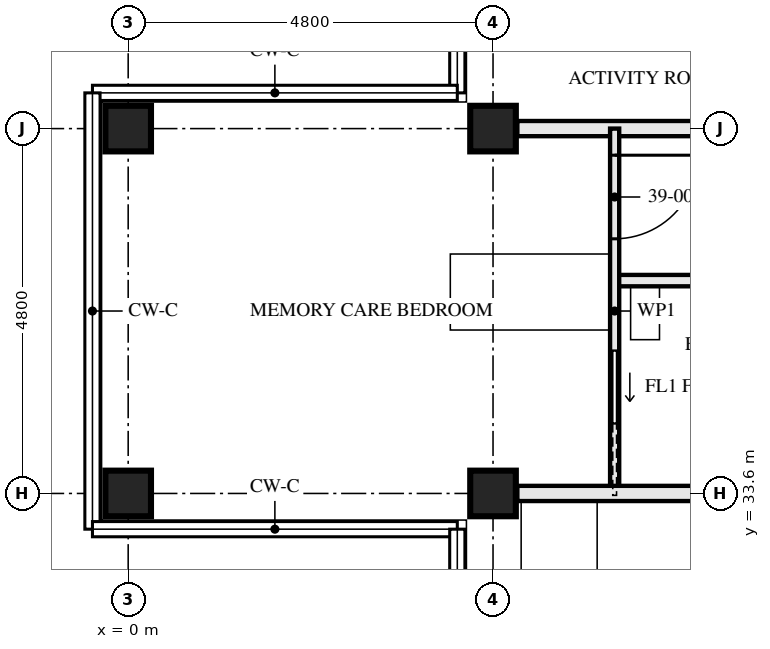
"""IFC4 building model, lengths in metres.
Left out: names, types, materials, properties, quantities, classifications, styles, units other than length and angle.
Written with IfcOpenShell. Run it as: python <this file> out.ifc"""

import sys

from ifc_helpers import new_model, si_unit, direction, frame, frame_2d, origin, origin_2d, place, context, subcontext, project, spatial, rectangle, hollow_rectangle, extrude, element, fill, save


model = new_model("IFC4")
c1 = context("Model", 3, precision=1e-05, world=origin(), true_north=direction((0.0, 1.0)))
c2 = subcontext(c1, "Body", "Model", "MODEL_VIEW")
j1 = project(units=[si_unit("LENGTHUNIT", "METRE"), si_unit("PLANEANGLEUNIT", "RADIAN")], contexts=[c1])
p1 = place(None, origin())
s1 = spatial("IfcSite", under=j1, at=p1, CompositionType="ELEMENT")
p2 = place(p1, origin())
s2 = spatial("IfcBuilding", under=s1, at=p2, CompositionType="ELEMENT")
p3 = place(p2, frame((0.0, 0.0, 144.5)))
s3 = spatial("IfcBuildingStorey", under=s2, at=p3, CompositionType="ELEMENT", Elevation=144.5)
for number, where, z_axis, x_axis in (
    (1, (0.0, 33.6, 0.0), (0.0, 0.0, 1.0), (0.0, 1.0, 0.0)),
    (2, (0.0, 38.4, 0.0), (0.0, 0.0, 1.0), (0.0, 1.0, 0.0)),
    (3, (4.8, 33.6, 0.0), (0.0, 0.0, 1.0), (0.0, 1.0, 0.0)),
    (4, (4.8, 38.4, 0.0), (0.0, 0.0, 1.0), (0.0, 1.0, 0.0)),
):
    element("IfcColumn", number, at=place(p3, frame(where, z_axis=z_axis, x_axis=x_axis)), inside=s3, PredefinedType="COLUMN", context=c2, shape_type="SweptSolid", body=[
        extrude(hollow_rectangle(XDim=0.6, YDim=0.6, WallThickness=0.08, at=origin_2d()), origin(), (0.0, 0.0, 1.0), 3.5),
    ])
p4 = place(p3, frame((5.12, 38.4, 0.0), z_axis=(0.0, 0.0, 1.0), x_axis=(1.0, 0.0, 0.0)))
e5 = element("IfcWall", 5, at=p4, inside=s3, PredefinedType="PARTITIONING", context=c2, shape_type="SweptSolid", body=[
    extrude(rectangle(XDim=7.28, YDim=0.2, at=frame_2d((3.64, 0.0))), origin(), (0.0, 0.0, 1.0), 2.55),
])
p5 = place(p3, frame((6.4, 36.4, 0.0), z_axis=(0.0, 0.0, 1.0), x_axis=(1.0, 0.0, 0.0)))
e6 = element("IfcWall", 6, at=p5, inside=s3, PredefinedType="PARTITIONING", context=c2, shape_type="SweptSolid", body=[
    extrude(rectangle(XDim=3.0, YDim=0.15, at=frame_2d((1.5, 0.0))), origin(), (0.0, 0.0, 1.0), 3.33),
])
p6 = place(p3, frame((6.4, 38.4, 0.0), z_axis=(0.0, 0.0, 1.0), x_axis=(0.0, -1.0, 0.0)))
e7 = element("IfcWall", 7, at=p6, inside=s3, PredefinedType="PARTITIONING", context=c2, shape_type="SweptSolid", body=[
    extrude(rectangle(XDim=4.8, YDim=0.12, at=frame_2d((2.4, 0.0))), origin(), (0.0, 0.0, 1.0), 3.33),
])
p7 = place(p6, frame((0.35, 0.0, 0.0)))
e8 = element("IfcOpeningElement", 8, at=p7, cuts=e7, PredefinedType="OPENING", context=c2, shape_type="SweptSolid", body=[
    extrude(rectangle(XDim=1.1, YDim=2.1, at=frame_2d((0.55, 1.05))), frame((0.0, 0.071, 0.0), z_axis=(0.0, -1.0, 0.0), x_axis=(1.0, 0.0, 0.0)), (0.0, 0.0, 1.0), 0.141),
])
p8 = place(p6, frame((2.925, 0.0, 0.0)))
e9 = element("IfcOpeningElement", 9, at=p8, cuts=e7, PredefinedType="OPENING", context=c2, shape_type="SweptSolid", body=[
    extrude(rectangle(XDim=0.95, YDim=2.1, at=frame_2d((0.475, 1.05))), frame((0.0, 0.071, 0.0), z_axis=(0.0, -1.0, 0.0), x_axis=(1.0, 0.0, 0.0)), (0.0, 0.0, 1.0), 0.141),
])
p9 = place(p3, frame((5.12, 33.6, 0.0), z_axis=(0.0, 0.0, 1.0), x_axis=(1.0, 0.0, 0.0)))
e10 = element("IfcWall", 10, at=p9, inside=s3, PredefinedType="PARTITIONING", context=c2, shape_type="SweptSolid", body=[
    extrude(rectangle(XDim=7.28, YDim=0.2, at=frame_2d((3.64, 0.0))), origin(), (0.0, 0.0, 1.0), 2.55),
])
p10 = place(p7, origin())
e11 = element("IfcDoor", 11, at=p10, inside=s3, OperationType="SINGLE_SWING_RIGHT", PredefinedType="DOOR", context=c2, shape_type="SweptSolid", body=[
    extrude(rectangle(XDim=1.1, YDim=2.1, at=frame_2d((0.55, 1.05))), frame((0.0, 0.022, 0.0), z_axis=(0.0, -1.0, 0.0), x_axis=(1.0, 0.0, 0.0)), (0.0, 0.0, 1.0), 0.044),
])
fill(e8, e11)
p11 = place(p8, origin())
e12 = element("IfcDoor", 12, at=p11, inside=s3, OperationType="SLIDING_TO_LEFT", PredefinedType="DOOR", context=c2, shape_type="SweptSolid", body=[
    extrude(rectangle(XDim=0.95, YDim=2.1, at=frame_2d((0.475, 1.05))), frame((0.0, 0.022, 0.0), z_axis=(0.0, -1.0, 0.0), x_axis=(1.0, 0.0, 0.0)), (0.0, 0.0, 1.0), 0.044),
])
fill(e9, e12)
save(model, sys.argv[1])
